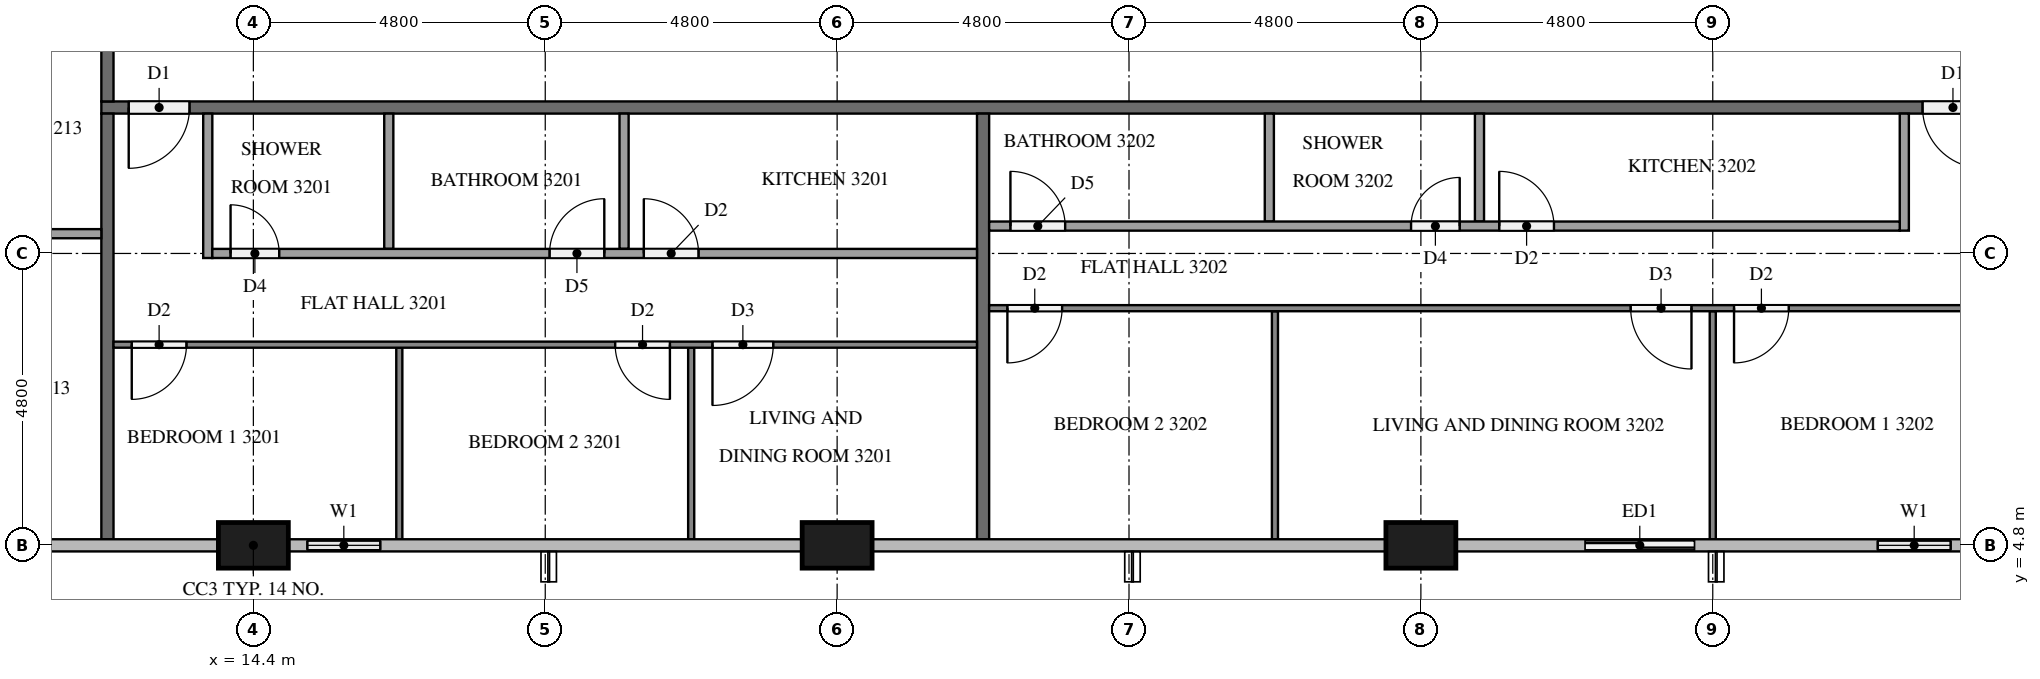
"""IFC4 building model, lengths in metres.
Left out: names, types, materials, properties, quantities, classifications, styles, units other than length and angle.
Written with IfcOpenShell. Run it as: python <this file> out.ifc"""

import sys

from ifc_helpers import new_model, si_unit, direction, frame, frame_2d, origin, origin_2d, place, context, subcontext, project, spatial, rectangle, extrude, element, fill, save


model = new_model("IFC4")
c1 = context("Model", 3, precision=1e-05, world=origin(), true_north=direction((0.0, 1.0)))
c2 = subcontext(c1, "Body", "Model", "MODEL_VIEW")
j1 = project(units=[si_unit("LENGTHUNIT", "METRE"), si_unit("PLANEANGLEUNIT", "RADIAN")], contexts=[c1])
p1 = place(None, origin())
s1 = spatial("IfcSite", under=j1, at=p1, CompositionType="ELEMENT")
p2 = place(p1, origin())
s2 = spatial("IfcBuilding", under=s1, at=p2, CompositionType="ELEMENT")
p3 = place(p2, frame((0.0, 0.0, 126.1)))
s3 = spatial("IfcBuildingStorey", under=s2, at=p3, CompositionType="ELEMENT", Elevation=126.1)
for number, where, z_axis, x_axis in (
    (1, (14.4, 4.8, 0.0), (0.0, 0.0, 1.0), (1.0, 0.0, 0.0)),
    (2, (24.0, 4.8, 0.0), (0.0, 0.0, 1.0), (1.0, 0.0, 0.0)),
    (3, (33.6, 4.8, 0.0), (0.0, 0.0, 1.0), (1.0, 0.0, 0.0)),
):
    element("IfcColumn", number, at=place(p3, frame(where, z_axis=z_axis, x_axis=x_axis)), inside=s3, PredefinedType="COLUMN", context=c2, shape_type="SweptSolid", body=[
        extrude(rectangle(XDim=1.15, YDim=0.75, at=origin_2d()), origin(), (0.0, 0.0, 1.0), 3.2),
    ])
p4 = place(p3, frame((14.975, 4.8, 0.0), z_axis=(0.0, 0.0, 1.0), x_axis=(1.0, 0.0, 0.0)))
e4 = element("IfcWall", 4, at=p4, inside=s3, PredefinedType="SOLIDWALL", context=c2, shape_type="SweptSolid", body=[
    extrude(rectangle(XDim=1.825, YDim=0.15, at=frame_2d((0.913, 0.0))), origin(), (0.0, 0.0, 1.0), 3.2),
])
p5 = place(p4, frame((0.312, 0.0, 0.9)))
e5 = element("IfcOpeningElement", 5, at=p5, cuts=e4, PredefinedType="OPENING", context=c2, shape_type="SweptSolid", body=[
    extrude(rectangle(XDim=1.2, YDim=1.4, at=frame_2d((0.6, 0.7))), frame((0.0, 0.085, 0.0), z_axis=(0.0, -1.0, 0.0), x_axis=(1.0, 0.0, 0.0)), (0.0, 0.0, 1.0), 0.17),
])
p6 = place(p3, frame((36.0, 4.8, 0.0), z_axis=(0.0, 0.0, 1.0), x_axis=(1.0, 0.0, 0.0)))
e6 = element("IfcWall", 6, at=p6, inside=s3, PredefinedType="SOLIDWALL", context=c2, shape_type="SweptSolid", body=[
    extrude(rectangle(XDim=2.4, YDim=0.15, at=frame_2d((1.2, 0.0))), origin(), (0.0, 0.0, 1.0), 3.2),
])
p7 = place(p6, frame((0.3, 0.0, 0.0)))
e7 = element("IfcOpeningElement", 7, at=p7, cuts=e6, PredefinedType="OPENING", context=c2, shape_type="SweptSolid", body=[
    extrude(rectangle(XDim=1.8, YDim=2.4, at=frame_2d((0.9, 1.2))), frame((0.0, 0.085, 0.0), z_axis=(0.0, -1.0, 0.0), x_axis=(1.0, 0.0, 0.0)), (0.0, 0.0, 1.0), 0.17),
])
p8 = place(p3, frame((40.8, 4.8, 0.0), z_axis=(0.0, 0.0, 1.0), x_axis=(1.0, 0.0, 0.0)))
e8 = element("IfcWall", 8, at=p8, inside=s3, PredefinedType="SOLIDWALL", context=c2, shape_type="SweptSolid", body=[
    extrude(rectangle(XDim=1.825, YDim=0.15, at=frame_2d((0.913, 0.0))), origin(), (0.0, 0.0, 1.0), 3.2),
])
p9 = place(p8, frame((0.312, 0.0, 0.9)))
e9 = element("IfcOpeningElement", 9, at=p9, cuts=e8, PredefinedType="OPENING", context=c2, shape_type="SweptSolid", body=[
    extrude(rectangle(XDim=1.2, YDim=1.4, at=frame_2d((0.6, 0.7))), frame((0.0, 0.085, 0.0), z_axis=(0.0, -1.0, 0.0), x_axis=(1.0, 0.0, 0.0)), (0.0, 0.0, 1.0), 0.17),
])
p10 = place(p3, frame((50.5, 12.0, 0.0), z_axis=(0.0, 0.0, 1.0), x_axis=(-1.0, 0.0, 0.0)))
e10 = element("IfcWall", 10, at=p10, inside=s3, PredefinedType="PARTITIONING", context=c2, shape_type="SweptSolid", body=[
    extrude(rectangle(XDim=38.6, YDim=0.2, at=frame_2d((19.3, 0.0))), origin(), (0.0, 0.0, 1.0), 3.2),
])
p11 = place(p10, frame((37.15, 0.0, 0.0)))
e11 = element("IfcOpeningElement", 11, at=p11, cuts=e10, PredefinedType="OPENING", context=c2, shape_type="SweptSolid", body=[
    extrude(rectangle(XDim=1.0, YDim=2.1, at=frame_2d((0.5, 1.05))), frame((0.0, 0.11, 0.0), z_axis=(0.0, -1.0, 0.0), x_axis=(1.0, 0.0, 0.0)), (0.0, 0.0, 1.0), 0.22),
])
p12 = place(p10, frame((7.65, 0.0, 0.0)))
e12 = element("IfcOpeningElement", 12, at=p12, cuts=e10, PredefinedType="OPENING", context=c2, shape_type="SweptSolid", body=[
    extrude(rectangle(XDim=1.0, YDim=2.1, at=frame_2d((0.5, 1.05))), frame((0.0, 0.11, 0.0), z_axis=(0.0, -1.0, 0.0), x_axis=(1.0, 0.0, 0.0)), (0.0, 0.0, 1.0), 0.22),
])
p13 = place(p10, frame((5.95, 0.0, 0.0)))
e13 = element("IfcOpeningElement", 13, at=p13, cuts=e10, PredefinedType="OPENING", context=c2, shape_type="SweptSolid", body=[
    extrude(rectangle(XDim=1.0, YDim=2.1, at=frame_2d((0.5, 1.05))), frame((0.0, 0.11, 0.0), z_axis=(0.0, -1.0, 0.0), x_axis=(1.0, 0.0, 0.0)), (0.0, 0.0, 1.0), 0.22),
])
p14 = place(p3, frame((12.0, 12.1, 0.0), z_axis=(0.0, 0.0, 1.0), x_axis=(0.0, 1.0, 0.0)))
e14 = element("IfcWall", 14, at=p14, inside=s3, PredefinedType="PARTITIONING", context=c2, shape_type="SweptSolid", body=[
    extrude(rectangle(XDim=2.8, YDim=0.2, at=frame_2d((1.4, 0.0))), origin(), (0.0, 0.0, 1.0), 3.2),
])
p15 = place(p14, frame((1.55, 0.0, 0.0)))
e15 = element("IfcOpeningElement", 15, at=p15, cuts=e14, PredefinedType="OPENING", context=c2, shape_type="SweptSolid", body=[
    extrude(rectangle(XDim=1.0, YDim=2.1, at=frame_2d((0.5, 1.05))), frame((0.0, 0.11, 0.0), z_axis=(0.0, -1.0, 0.0), x_axis=(1.0, 0.0, 0.0)), (0.0, 0.0, 1.0), 0.22),
])
for number, where, z_axis, x_axis in (
    (16, (26.4, 11.9, 0.0), (0.0, 0.0, 1.0), (0.0, -1.0, 0.0)),
    (17, (12.0, 4.9, 0.0), (0.0, 0.0, 1.0), (0.0, 1.0, 0.0)),
):
    element("IfcWall", number, at=place(p3, frame(where, z_axis=z_axis, x_axis=x_axis)), inside=s3, PredefinedType="PARTITIONING", context=c2, shape_type="SweptSolid", body=[
        extrude(rectangle(XDim=7.0, YDim=0.2, at=frame_2d((3.5, 0.0))), origin(), (0.0, 0.0, 1.0), 3.2),
    ])
for number, where, z_axis, x_axis in (
    (18, (16.8, 8.05, 0.0), (0.0, 0.0, 1.0), (0.0, -1.0, 0.0)),
    (19, (21.6, 8.05, 0.0), (0.0, 0.0, 1.0), (0.0, -1.0, 0.0)),
):
    element("IfcWall", number, at=place(p3, frame(where, z_axis=z_axis, x_axis=x_axis)), inside=s3, PredefinedType="PARTITIONING", context=c2, shape_type="SweptSolid", body=[
        extrude(rectangle(XDim=3.15, YDim=0.1, at=frame_2d((1.575, 0.0))), origin(), (0.0, 0.0, 1.0), 3.2),
    ])
p16 = place(p3, frame((26.3, 8.1, 0.0), z_axis=(0.0, 0.0, 1.0), x_axis=(-1.0, 0.0, 0.0)))
e20 = element("IfcWall", 20, at=p16, inside=s3, PredefinedType="PARTITIONING", context=c2, shape_type="SweptSolid", body=[
    extrude(rectangle(XDim=14.2, YDim=0.1, at=frame_2d((7.1, 0.0))), origin(), (0.0, 0.0, 1.0), 3.2),
])
p17 = place(p16, frame((13.0, 0.0, 0.0)))
e21 = element("IfcOpeningElement", 21, at=p17, cuts=e20, PredefinedType="OPENING", context=c2, shape_type="SweptSolid", body=[
    extrude(rectangle(XDim=0.9, YDim=2.1, at=frame_2d((0.45, 1.05))), frame((0.0, 0.06, 0.0), z_axis=(0.0, -1.0, 0.0), x_axis=(1.0, 0.0, 0.0)), (0.0, 0.0, 1.0), 0.12),
])
p18 = place(p16, frame((5.05, 0.0, 0.0)))
e22 = element("IfcOpeningElement", 22, at=p18, cuts=e20, PredefinedType="OPENING", context=c2, shape_type="SweptSolid", body=[
    extrude(rectangle(XDim=0.9, YDim=2.1, at=frame_2d((0.45, 1.05))), frame((0.0, 0.06, 0.0), z_axis=(0.0, -1.0, 0.0), x_axis=(1.0, 0.0, 0.0)), (0.0, 0.0, 1.0), 0.12),
])
p19 = place(p16, frame((3.35, 0.0, 0.0)))
e23 = element("IfcOpeningElement", 23, at=p19, cuts=e20, PredefinedType="OPENING", context=c2, shape_type="SweptSolid", body=[
    extrude(rectangle(XDim=1.0, YDim=2.1, at=frame_2d((0.5, 1.05))), frame((0.0, 0.06, 0.0), z_axis=(0.0, -1.0, 0.0), x_axis=(1.0, 0.0, 0.0)), (0.0, 0.0, 1.0), 0.12),
])
for number, where, z_axis, x_axis in (
    (24, (16.627, 11.9, 0.0), (0.0, 0.0, 1.0), (0.0, -1.0, 0.0)),
    (25, (20.496, 11.9, 0.0), (0.0, 0.0, 1.0), (0.0, -1.0, 0.0)),
):
    element("IfcWall", number, at=place(p3, frame(where, z_axis=z_axis, x_axis=x_axis)), inside=s3, PredefinedType="PARTITIONING", context=c2, shape_type="SweptSolid", body=[
        extrude(rectangle(XDim=2.225, YDim=0.15, at=frame_2d((1.112, 0.0))), origin(), (0.0, 0.0, 1.0), 3.2),
    ])
p20 = place(p3, frame((13.65, 11.9, 0.0), z_axis=(0.0, 0.0, 1.0), x_axis=(0.0, -1.0, 0.0)))
e26 = element("IfcWall", 26, at=p20, inside=s3, PredefinedType="PARTITIONING", context=c2, shape_type="SweptSolid", body=[
    extrude(rectangle(XDim=2.375, YDim=0.15, at=frame_2d((1.188, 0.0))), origin(), (0.0, 0.0, 1.0), 3.2),
])
p21 = place(p3, frame((13.725, 9.6, 0.0), z_axis=(0.0, 0.0, 1.0), x_axis=(1.0, 0.0, 0.0)))
e27 = element("IfcWall", 27, at=p21, inside=s3, PredefinedType="PARTITIONING", context=c2, shape_type="SweptSolid", body=[
    extrude(rectangle(XDim=12.575, YDim=0.15, at=frame_2d((6.288, 0.0))), origin(), (0.0, 0.0, 1.0), 3.2),
])
p22 = place(p21, frame((0.3, 0.0, 0.0)))
e28 = element("IfcOpeningElement", 28, at=p22, cuts=e27, PredefinedType="OPENING", context=c2, shape_type="SweptSolid", body=[
    extrude(rectangle(XDim=0.8, YDim=2.1, at=frame_2d((0.4, 1.05))), frame((0.0, 0.085, 0.0), z_axis=(0.0, -1.0, 0.0), x_axis=(1.0, 0.0, 0.0)), (0.0, 0.0, 1.0), 0.17),
])
p23 = place(p21, frame((5.546, 0.0, 0.0)))
e29 = element("IfcOpeningElement", 29, at=p23, cuts=e27, PredefinedType="OPENING", context=c2, shape_type="SweptSolid", body=[
    extrude(rectangle(XDim=0.9, YDim=2.1, at=frame_2d((0.45, 1.05))), frame((0.0, 0.085, 0.0), z_axis=(0.0, -1.0, 0.0), x_axis=(1.0, 0.0, 0.0)), (0.0, 0.0, 1.0), 0.17),
])
p24 = place(p21, frame((7.096, 0.0, 0.0)))
e30 = element("IfcOpeningElement", 30, at=p24, cuts=e27, PredefinedType="OPENING", context=c2, shape_type="SweptSolid", body=[
    extrude(rectangle(XDim=0.9, YDim=2.1, at=frame_2d((0.45, 1.05))), frame((0.0, 0.085, 0.0), z_axis=(0.0, -1.0, 0.0), x_axis=(1.0, 0.0, 0.0)), (0.0, 0.0, 1.0), 0.17),
])
for number, where, z_axis, x_axis in (
    (31, (38.4, 8.65, 0.0), (0.0, 0.0, 1.0), (0.0, -1.0, 0.0)),
    (32, (31.2, 8.65, 0.0), (0.0, 0.0, 1.0), (0.0, -1.0, 0.0)),
):
    element("IfcWall", number, at=place(p3, frame(where, z_axis=z_axis, x_axis=x_axis)), inside=s3, PredefinedType="PARTITIONING", context=c2, shape_type="SweptSolid", body=[
        extrude(rectangle(XDim=3.75, YDim=0.1, at=frame_2d((1.875, 0.0))), origin(), (0.0, 0.0, 1.0), 3.2),
    ])
p25 = place(p3, frame((43.1, 8.7, 0.0), z_axis=(0.0, 0.0, 1.0), x_axis=(-1.0, 0.0, 0.0)))
e33 = element("IfcWall", 33, at=p25, inside=s3, PredefinedType="PARTITIONING", context=c2, shape_type="SweptSolid", body=[
    extrude(rectangle(XDim=16.6, YDim=0.1, at=frame_2d((8.3, 0.0))), origin(), (0.0, 0.0, 1.0), 3.2),
])
p26 = place(p25, frame((3.45, 0.0, 0.0)))
e34 = element("IfcOpeningElement", 34, at=p26, cuts=e33, PredefinedType="OPENING", context=c2, shape_type="SweptSolid", body=[
    extrude(rectangle(XDim=0.9, YDim=2.1, at=frame_2d((0.45, 1.05))), frame((0.0, 0.06, 0.0), z_axis=(0.0, -1.0, 0.0), x_axis=(1.0, 0.0, 0.0)), (0.0, 0.0, 1.0), 0.12),
])
p27 = place(p25, frame((5.05, 0.0, 0.0)))
e35 = element("IfcOpeningElement", 35, at=p27, cuts=e33, PredefinedType="OPENING", context=c2, shape_type="SweptSolid", body=[
    extrude(rectangle(XDim=1.0, YDim=2.1, at=frame_2d((0.5, 1.05))), frame((0.0, 0.06, 0.0), z_axis=(0.0, -1.0, 0.0), x_axis=(1.0, 0.0, 0.0)), (0.0, 0.0, 1.0), 0.12),
])
p28 = place(p25, frame((15.4, 0.0, 0.0)))
e36 = element("IfcOpeningElement", 36, at=p28, cuts=e33, PredefinedType="OPENING", context=c2, shape_type="SweptSolid", body=[
    extrude(rectangle(XDim=0.9, YDim=2.1, at=frame_2d((0.45, 1.05))), frame((0.0, 0.06, 0.0), z_axis=(0.0, -1.0, 0.0), x_axis=(1.0, 0.0, 0.0)), (0.0, 0.0, 1.0), 0.12),
])
for number, where, z_axis, x_axis in (
    (37, (34.563, 11.9, 0.0), (0.0, 0.0, 1.0), (0.0, -1.0, 0.0)),
    (38, (31.108, 11.9, 0.0), (0.0, 0.0, 1.0), (0.0, -1.0, 0.0)),
):
    element("IfcWall", number, at=place(p3, frame(where, z_axis=z_axis, x_axis=x_axis)), inside=s3, PredefinedType="PARTITIONING", context=c2, shape_type="SweptSolid", body=[
        extrude(rectangle(XDim=1.775, YDim=0.15, at=frame_2d((0.887, 0.0))), origin(), (0.0, 0.0, 1.0), 3.2),
    ])
p29 = place(p3, frame((41.55, 11.9, 0.0), z_axis=(0.0, 0.0, 1.0), x_axis=(0.0, -1.0, 0.0)))
e39 = element("IfcWall", 39, at=p29, inside=s3, PredefinedType="PARTITIONING", context=c2, shape_type="SweptSolid", body=[
    extrude(rectangle(XDim=1.925, YDim=0.15, at=frame_2d((0.962, 0.0))), origin(), (0.0, 0.0, 1.0), 3.2),
])
p30 = place(p3, frame((26.5, 10.05, 0.0), z_axis=(0.0, 0.0, 1.0), x_axis=(1.0, 0.0, 0.0)))
e40 = element("IfcWall", 40, at=p30, inside=s3, PredefinedType="PARTITIONING", context=c2, shape_type="SweptSolid", body=[
    extrude(rectangle(XDim=14.975, YDim=0.15, at=frame_2d((7.488, 0.0))), origin(), (0.0, 0.0, 1.0), 3.2),
])
p31 = place(p30, frame((8.388, 0.0, 0.0)))
e41 = element("IfcOpeningElement", 41, at=p31, cuts=e40, PredefinedType="OPENING", context=c2, shape_type="SweptSolid", body=[
    extrude(rectangle(XDim=0.9, YDim=2.1, at=frame_2d((0.45, 1.05))), frame((0.0, 0.085, 0.0), z_axis=(0.0, -1.0, 0.0), x_axis=(1.0, 0.0, 0.0)), (0.0, 0.0, 1.0), 0.17),
])
p32 = place(p30, frame((6.938, 0.0, 0.0)))
e42 = element("IfcOpeningElement", 42, at=p32, cuts=e40, PredefinedType="OPENING", context=c2, shape_type="SweptSolid", body=[
    extrude(rectangle(XDim=0.8, YDim=2.1, at=frame_2d((0.4, 1.05))), frame((0.0, 0.085, 0.0), z_axis=(0.0, -1.0, 0.0), x_axis=(1.0, 0.0, 0.0)), (0.0, 0.0, 1.0), 0.17),
])
p33 = place(p30, frame((0.35, 0.0, 0.0)))
e43 = element("IfcOpeningElement", 43, at=p33, cuts=e40, PredefinedType="OPENING", context=c2, shape_type="SweptSolid", body=[
    extrude(rectangle(XDim=0.9, YDim=2.1, at=frame_2d((0.45, 1.05))), frame((0.0, 0.085, 0.0), z_axis=(0.0, -1.0, 0.0), x_axis=(1.0, 0.0, 0.0)), (0.0, 0.0, 1.0), 0.17),
])
p34 = place(p3, frame((11.9, 9.925, 0.0), z_axis=(0.0, 0.0, 1.0), x_axis=(-1.0, 0.0, 0.0)))
e44 = element("IfcWall", 44, at=p34, inside=s3, PredefinedType="PARTITIONING", context=c2, shape_type="SweptSolid", body=[
    extrude(rectangle(XDim=3.125, YDim=0.15, at=frame_2d((1.562, 0.0))), origin(), (0.0, 0.0, 1.0), 3.2),
])
p35 = place(p5, origin())
e45 = element("IfcWindow", 45, at=p35, inside=s3, PartitioningType="SINGLE_PANEL", PredefinedType="WINDOW", context=c2, shape_type="SweptSolid", body=[
    extrude(rectangle(XDim=1.2, YDim=1.4, at=frame_2d((0.6, 0.7))), frame((0.0, 0.03, 0.0), z_axis=(0.0, -1.0, 0.0), x_axis=(1.0, 0.0, 0.0)), (0.0, 0.0, 1.0), 0.06),
])
fill(e5, e45)
p36 = place(p7, origin())
e46 = element("IfcDoor", 46, at=p36, inside=s3, OperationType="SLIDING_TO_LEFT", PredefinedType="DOOR", context=c2, shape_type="SweptSolid", body=[
    extrude(rectangle(XDim=1.8, YDim=2.4, at=frame_2d((0.9, 1.2))), frame((0.0, 0.025, 0.0), z_axis=(0.0, -1.0, 0.0), x_axis=(1.0, 0.0, 0.0)), (0.0, 0.0, 1.0), 0.05),
])
fill(e7, e46)
p37 = place(p9, origin())
e47 = element("IfcWindow", 47, at=p37, inside=s3, PartitioningType="SINGLE_PANEL", PredefinedType="WINDOW", context=c2, shape_type="SweptSolid", body=[
    extrude(rectangle(XDim=1.2, YDim=1.4, at=frame_2d((0.6, 0.7))), frame((0.0, 0.03, 0.0), z_axis=(0.0, -1.0, 0.0), x_axis=(1.0, 0.0, 0.0)), (0.0, 0.0, 1.0), 0.06),
])
fill(e9, e47)
p38 = place(p11, origin())
e48 = element("IfcDoor", 48, at=p38, inside=s3, OperationType="SINGLE_SWING_RIGHT", PredefinedType="DOOR", context=c2, shape_type="SweptSolid", body=[
    extrude(rectangle(XDim=1.0, YDim=2.1, at=frame_2d((0.5, 1.05))), frame((0.0, 0.025, 0.0), z_axis=(0.0, -1.0, 0.0), x_axis=(1.0, 0.0, 0.0)), (0.0, 0.0, 1.0), 0.05),
])
fill(e11, e48)
p39 = place(p12, origin())
e49 = element("IfcDoor", 49, at=p39, inside=s3, OperationType="SINGLE_SWING_LEFT", PredefinedType="DOOR", context=c2, shape_type="SweptSolid", body=[
    extrude(rectangle(XDim=1.0, YDim=2.1, at=frame_2d((0.5, 1.05))), frame((0.0, 0.025, 0.0), z_axis=(0.0, -1.0, 0.0), x_axis=(1.0, 0.0, 0.0)), (0.0, 0.0, 1.0), 0.05),
])
fill(e12, e49)
p40 = place(p17, origin())
e50 = element("IfcDoor", 50, at=p40, inside=s3, OperationType="SINGLE_SWING_RIGHT", PredefinedType="DOOR", context=c2, shape_type="SweptSolid", body=[
    extrude(rectangle(XDim=0.9, YDim=2.1, at=frame_2d((0.45, 1.05))), frame((0.0, 0.025, 0.0), z_axis=(0.0, -1.0, 0.0), x_axis=(1.0, 0.0, 0.0)), (0.0, 0.0, 1.0), 0.05),
])
fill(e21, e50)
p41 = place(p18, origin())
e51 = element("IfcDoor", 51, at=p41, inside=s3, OperationType="SINGLE_SWING_LEFT", PredefinedType="DOOR", context=c2, shape_type="SweptSolid", body=[
    extrude(rectangle(XDim=0.9, YDim=2.1, at=frame_2d((0.45, 1.05))), frame((0.0, 0.025, 0.0), z_axis=(0.0, -1.0, 0.0), x_axis=(1.0, 0.0, 0.0)), (0.0, 0.0, 1.0), 0.05),
])
fill(e22, e51)
p42 = place(p19, origin())
e52 = element("IfcDoor", 52, at=p42, inside=s3, OperationType="SINGLE_SWING_RIGHT", PredefinedType="DOOR", context=c2, shape_type="SweptSolid", body=[
    extrude(rectangle(XDim=1.0, YDim=2.1, at=frame_2d((0.5, 1.05))), frame((0.0, 0.025, 0.0), z_axis=(0.0, -1.0, 0.0), x_axis=(1.0, 0.0, 0.0)), (0.0, 0.0, 1.0), 0.05),
])
fill(e23, e52)
p43 = place(p22, origin())
e53 = element("IfcDoor", 53, at=p43, inside=s3, OperationType="SINGLE_SWING_LEFT", PredefinedType="DOOR", context=c2, shape_type="SweptSolid", body=[
    extrude(rectangle(XDim=0.8, YDim=2.1, at=frame_2d((0.4, 1.05))), frame((0.0, 0.025, 0.0), z_axis=(0.0, -1.0, 0.0), x_axis=(1.0, 0.0, 0.0)), (0.0, 0.0, 1.0), 0.05),
])
fill(e28, e53)
p44 = place(p23, origin())
e54 = element("IfcDoor", 54, at=p44, inside=s3, OperationType="SINGLE_SWING_RIGHT", PredefinedType="DOOR", context=c2, shape_type="SweptSolid", body=[
    extrude(rectangle(XDim=0.9, YDim=2.1, at=frame_2d((0.45, 1.05))), frame((0.0, 0.025, 0.0), z_axis=(0.0, -1.0, 0.0), x_axis=(1.0, 0.0, 0.0)), (0.0, 0.0, 1.0), 0.05),
])
fill(e29, e54)
p45 = place(p24, origin())
e55 = element("IfcDoor", 55, at=p45, inside=s3, OperationType="SINGLE_SWING_LEFT", PredefinedType="DOOR", context=c2, shape_type="SweptSolid", body=[
    extrude(rectangle(XDim=0.9, YDim=2.1, at=frame_2d((0.45, 1.05))), frame((0.0, 0.025, 0.0), z_axis=(0.0, -1.0, 0.0), x_axis=(1.0, 0.0, 0.0)), (0.0, 0.0, 1.0), 0.05),
])
fill(e30, e55)
p46 = place(p26, origin())
e56 = element("IfcDoor", 56, at=p46, inside=s3, OperationType="SINGLE_SWING_RIGHT", PredefinedType="DOOR", context=c2, shape_type="SweptSolid", body=[
    extrude(rectangle(XDim=0.9, YDim=2.1, at=frame_2d((0.45, 1.05))), frame((0.0, 0.025, 0.0), z_axis=(0.0, -1.0, 0.0), x_axis=(1.0, 0.0, 0.0)), (0.0, 0.0, 1.0), 0.05),
])
fill(e34, e56)
p47 = place(p27, origin())
e57 = element("IfcDoor", 57, at=p47, inside=s3, OperationType="SINGLE_SWING_LEFT", PredefinedType="DOOR", context=c2, shape_type="SweptSolid", body=[
    extrude(rectangle(XDim=1.0, YDim=2.1, at=frame_2d((0.5, 1.05))), frame((0.0, 0.025, 0.0), z_axis=(0.0, -1.0, 0.0), x_axis=(1.0, 0.0, 0.0)), (0.0, 0.0, 1.0), 0.05),
])
fill(e35, e57)
p48 = place(p28, origin())
e58 = element("IfcDoor", 58, at=p48, inside=s3, OperationType="SINGLE_SWING_RIGHT", PredefinedType="DOOR", context=c2, shape_type="SweptSolid", body=[
    extrude(rectangle(XDim=0.9, YDim=2.1, at=frame_2d((0.45, 1.05))), frame((0.0, 0.025, 0.0), z_axis=(0.0, -1.0, 0.0), x_axis=(1.0, 0.0, 0.0)), (0.0, 0.0, 1.0), 0.05),
])
fill(e36, e58)
p49 = place(p31, origin())
e59 = element("IfcDoor", 59, at=p49, inside=s3, OperationType="SINGLE_SWING_LEFT", PredefinedType="DOOR", context=c2, shape_type="SweptSolid", body=[
    extrude(rectangle(XDim=0.9, YDim=2.1, at=frame_2d((0.45, 1.05))), frame((0.0, 0.025, 0.0), z_axis=(0.0, -1.0, 0.0), x_axis=(1.0, 0.0, 0.0)), (0.0, 0.0, 1.0), 0.05),
])
fill(e41, e59)
p50 = place(p32, origin())
e60 = element("IfcDoor", 60, at=p50, inside=s3, OperationType="SINGLE_SWING_RIGHT", PredefinedType="DOOR", context=c2, shape_type="SweptSolid", body=[
    extrude(rectangle(XDim=0.8, YDim=2.1, at=frame_2d((0.4, 1.05))), frame((0.0, 0.025, 0.0), z_axis=(0.0, -1.0, 0.0), x_axis=(1.0, 0.0, 0.0)), (0.0, 0.0, 1.0), 0.05),
])
fill(e42, e60)
p51 = place(p33, origin())
e61 = element("IfcDoor", 61, at=p51, inside=s3, OperationType="SINGLE_SWING_LEFT", PredefinedType="DOOR", context=c2, shape_type="SweptSolid", body=[
    extrude(rectangle(XDim=0.9, YDim=2.1, at=frame_2d((0.45, 1.05))), frame((0.0, 0.025, 0.0), z_axis=(0.0, -1.0, 0.0), x_axis=(1.0, 0.0, 0.0)), (0.0, 0.0, 1.0), 0.05),
])
fill(e43, e61)
save(model, sys.argv[1])
